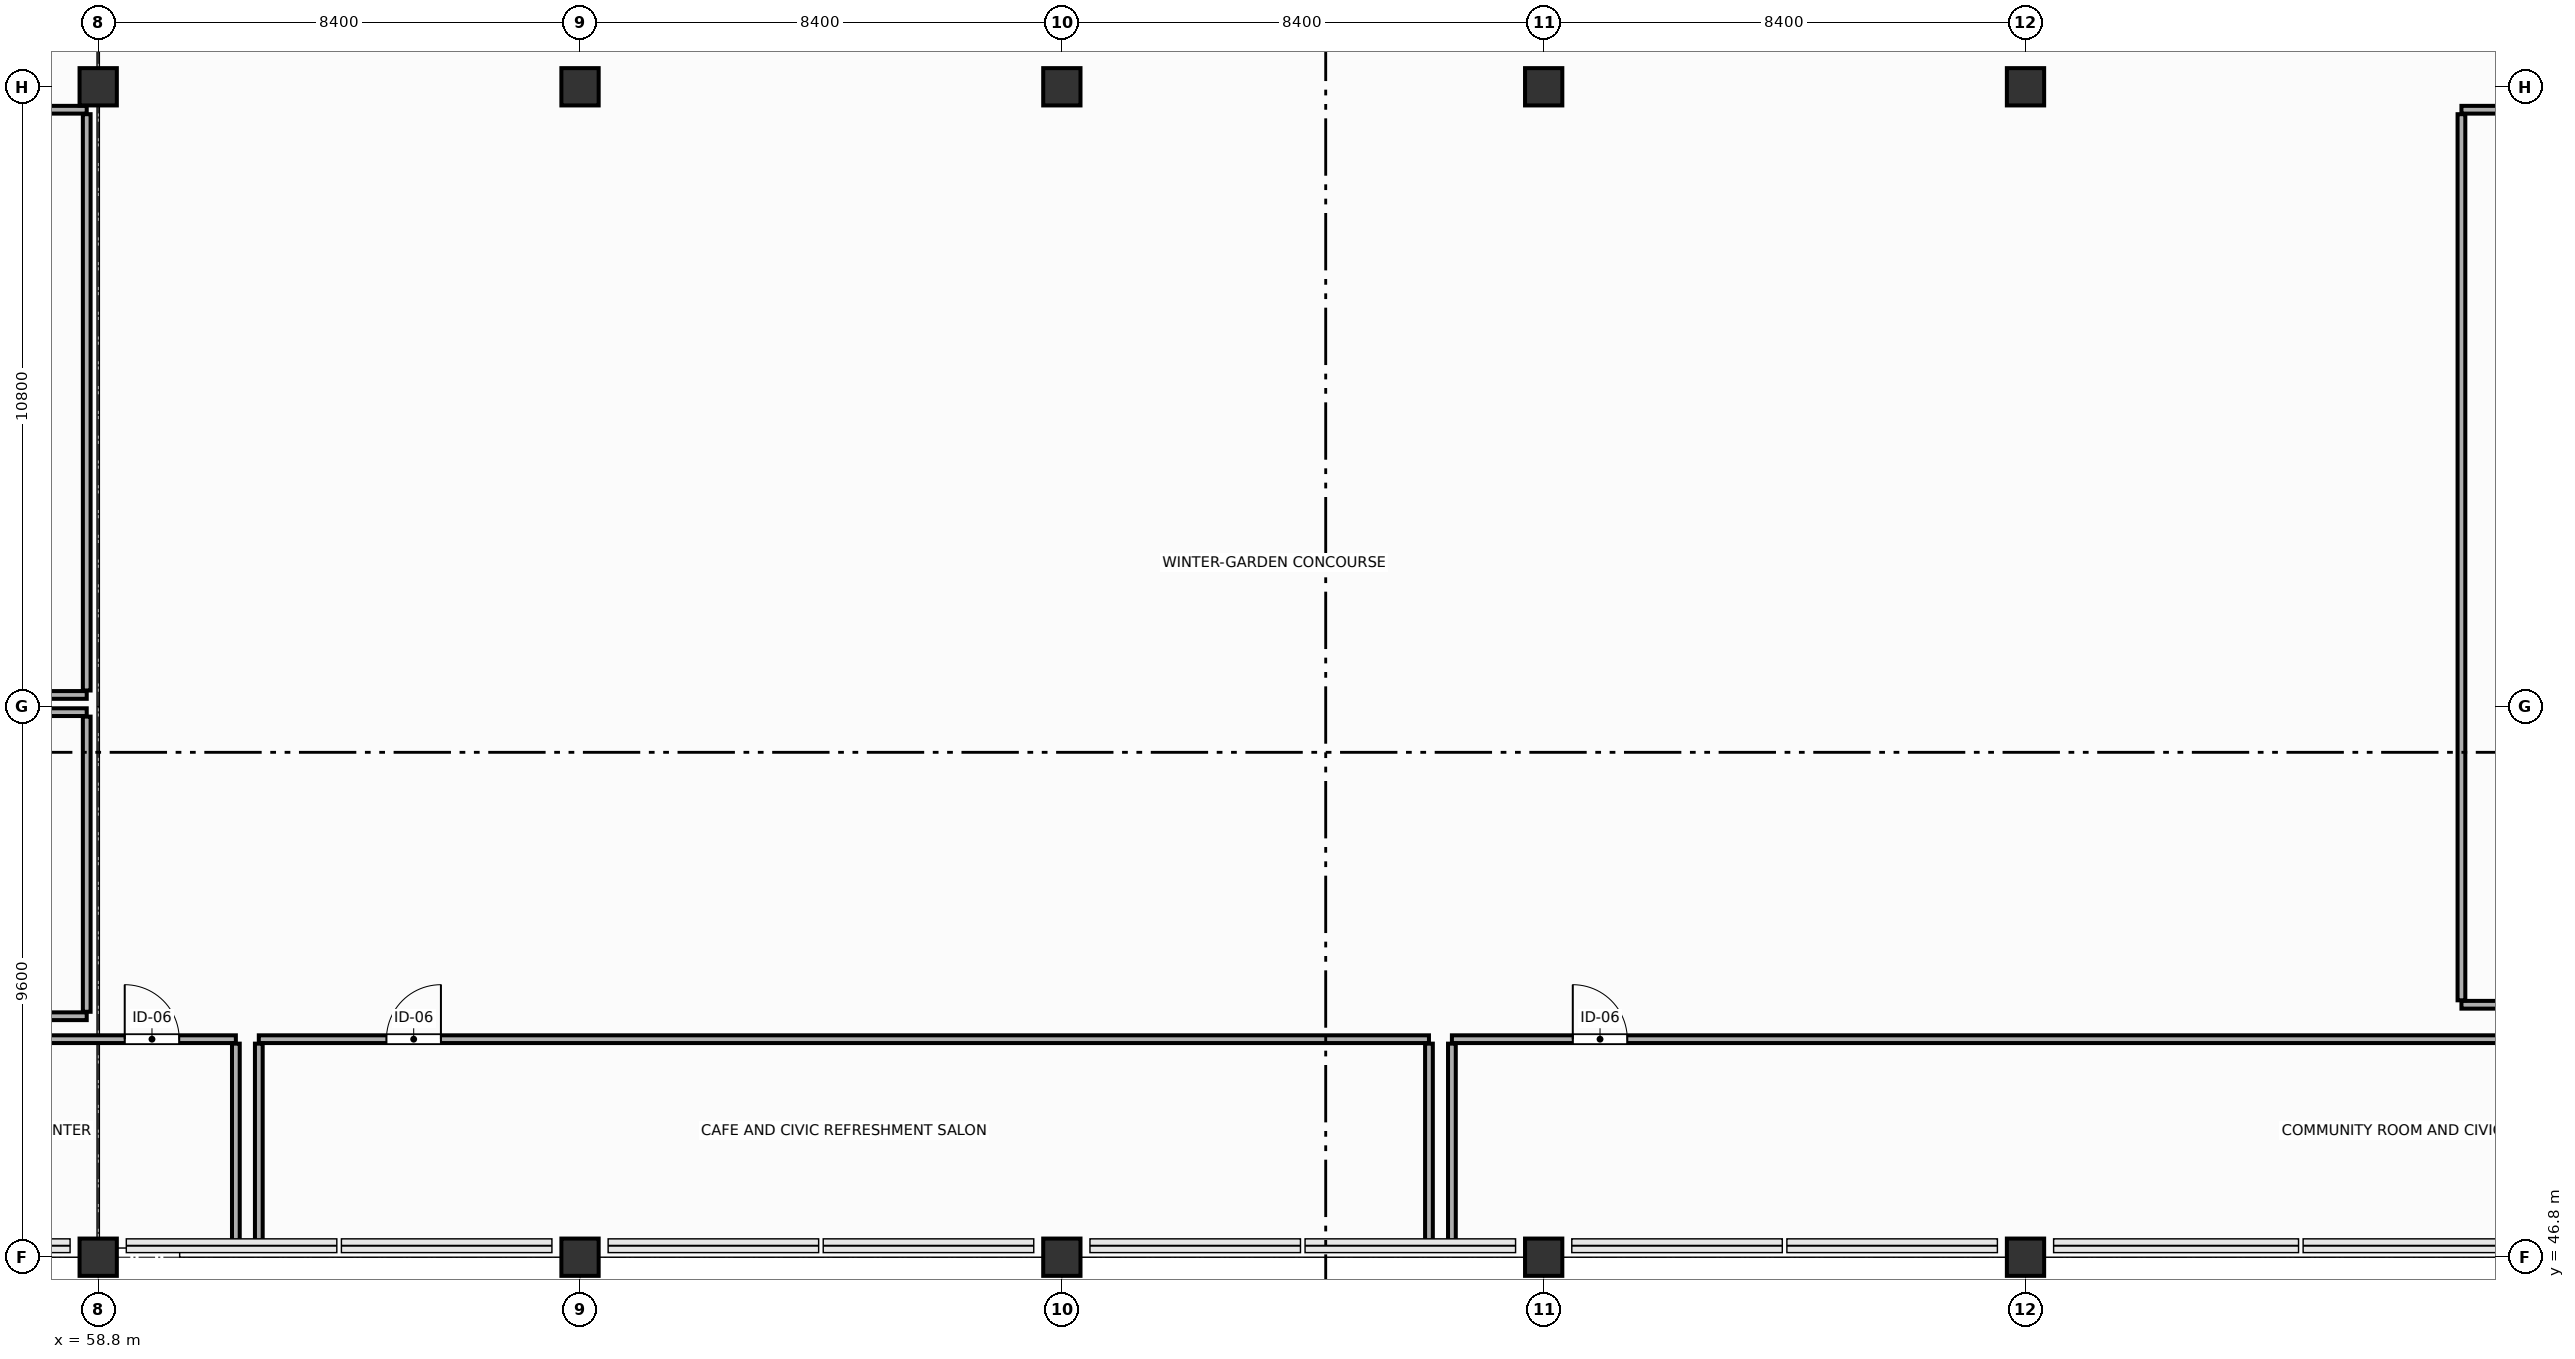
"""IFC4 building model, lengths in metres.
Left out: names, types, materials, properties, quantities, classifications, styles, units other than length and angle.
Written with IfcOpenShell. Run it as: python <this file> out.ifc"""

import sys

from ifc_helpers import new_model, si_unit, direction, frame, frame_2d, origin, origin_2d, place, context, subcontext, project, spatial, rectangle, extrude, element, fill, save


model = new_model("IFC4")
c1 = context("Model", 3, precision=1e-05, world=origin(), true_north=direction((0.0, 1.0)))
c2 = subcontext(c1, "Body", "Model", "MODEL_VIEW")
j1 = project(units=[si_unit("LENGTHUNIT", "METRE"), si_unit("PLANEANGLEUNIT", "RADIAN")], contexts=[c1])
p1 = place(None, origin())
s1 = spatial("IfcSite", under=j1, at=p1, CompositionType="ELEMENT")
p2 = place(p1, origin())
s2 = spatial("IfcBuilding", under=s1, at=p2, CompositionType="ELEMENT")
p3 = place(p2, origin())
s3 = spatial("IfcBuildingStorey", under=s2, at=p3, CompositionType="ELEMENT", Elevation=0.0)
for number, where, z_axis, x_axis in (
    (1, (58.8, 46.8, 0.0), (0.0, 0.0, 1.0), (1.0, 0.0, 0.0)),
    (2, (58.8, 67.2, 0.0), (0.0, 0.0, 1.0), (1.0, 0.0, 0.0)),
    (3, (67.2, 46.8, 0.0), (0.0, 0.0, 1.0), (1.0, 0.0, 0.0)),
    (4, (67.2, 67.2, 0.0), (0.0, 0.0, 1.0), (1.0, 0.0, 0.0)),
    (5, (75.6, 46.8, 0.0), (0.0, 0.0, 1.0), (1.0, 0.0, 0.0)),
    (6, (75.6, 67.2, 0.0), (0.0, 0.0, 1.0), (1.0, 0.0, 0.0)),
    (7, (84.0, 46.8, 0.0), (0.0, 0.0, 1.0), (1.0, 0.0, 0.0)),
    (8, (84.0, 67.2, 0.0), (0.0, 0.0, 1.0), (1.0, 0.0, 0.0)),
    (9, (92.4, 46.8, 0.0), (0.0, 0.0, 1.0), (1.0, 0.0, 0.0)),
    (10, (92.4, 67.2, 0.0), (0.0, 0.0, 1.0), (1.0, 0.0, 0.0)),
):
    element("IfcColumn", number, at=place(p3, frame(where, z_axis=z_axis, x_axis=x_axis)), inside=s3, PredefinedType="COLUMN", context=c2, shape_type="SweptSolid", body=[
        extrude(rectangle(XDim=0.65, YDim=0.65, at=origin_2d()), origin(), (0.0, 0.0, 1.0), 5.4),
    ])
p4 = place(p3, frame((46.8, 66.8, 0.0), z_axis=(0.0, 0.0, 1.0), x_axis=(1.0, 0.0, 0.0)))
e11 = element("IfcWall", 11, at=p4, inside=s3, PredefinedType="PARTITIONING", context=c2, shape_type="SweptSolid", body=[
    extrude(rectangle(XDim=11.8, YDim=0.135, at=frame_2d((5.9, 0.0))), origin(), (0.0, 0.0, 1.0), 4.13),
])
p5 = place(p4, frame((2.366, 0.0, 0.0)))
e12 = element("IfcOpeningElement", 12, at=p5, cuts=e11, PredefinedType="OPENING", context=c2, shape_type="SweptSolid", body=[
    extrude(rectangle(XDim=1.02, YDim=2.15, at=frame_2d((0.51, 1.075))), frame((0.0, 0.077, 0.0), z_axis=(0.0, -1.0, 0.0), x_axis=(1.0, 0.0, 0.0)), (0.0, 0.0, 1.0), 0.155),
])
p6 = place(p3, frame((58.6, 56.6, 0.0), z_axis=(0.0, 0.0, 1.0), x_axis=(-1.0, 0.0, 0.0)))
e13 = element("IfcWall", 13, at=p6, inside=s3, PredefinedType="PARTITIONING", context=c2, shape_type="SweptSolid", body=[
    extrude(rectangle(XDim=11.8, YDim=0.135, at=frame_2d((5.9, 0.0))), origin(), (0.0, 0.0, 1.0), 4.13),
])
p7 = place(p3, frame((58.6, 66.722, 0.0), z_axis=(0.0, 0.0, 1.0), x_axis=(0.0, -1.0, 0.0)))
e14 = element("IfcWall", 14, at=p7, inside=s3, PredefinedType="PARTITIONING", context=c2, shape_type="SweptSolid", body=[
    extrude(rectangle(XDim=10.045, YDim=0.135, at=frame_2d((5.022, 0.0))), origin(), (0.0, 0.0, 1.0), 4.13),
])
for number, where, z_axis, x_axis in (
    (15, (46.8, 56.3, 0.0), (0.0, 0.0, 1.0), (1.0, 0.0, 0.0)),
    (16, (58.6, 51.0, 0.0), (0.0, 0.0, 1.0), (-1.0, 0.0, 0.0)),
):
    element("IfcWall", number, at=place(p3, frame(where, z_axis=z_axis, x_axis=x_axis)), inside=s3, PredefinedType="PARTITIONING", context=c2, shape_type="SweptSolid", body=[
        extrude(rectangle(XDim=11.8, YDim=0.135, at=frame_2d((5.9, 0.0))), origin(), (0.0, 0.0, 1.0), 4.13),
    ])
p8 = place(p3, frame((58.6, 56.222, 0.0), z_axis=(0.0, 0.0, 1.0), x_axis=(0.0, -1.0, 0.0)))
e17 = element("IfcWall", 17, at=p8, inside=s3, PredefinedType="PARTITIONING", context=c2, shape_type="SweptSolid", body=[
    extrude(rectangle(XDim=5.145, YDim=0.135, at=frame_2d((2.573, 0.0))), origin(), (0.0, 0.0, 1.0), 4.13),
])
p9 = place(p3, frame((46.8, 50.6, 0.0), z_axis=(0.0, 0.0, 1.0), x_axis=(1.0, 0.0, 0.0)))
e18 = element("IfcWall", 18, at=p9, inside=s3, PredefinedType="PARTITIONING", context=c2, shape_type="SweptSolid", body=[
    extrude(rectangle(XDim=14.4, YDim=0.135, at=frame_2d((7.2, 0.0))), origin(), (0.0, 0.0, 1.0), 4.13),
])
p10 = place(p9, frame((12.462, 0.0, 0.0)))
e19 = element("IfcOpeningElement", 19, at=p10, cuts=e18, PredefinedType="OPENING", context=c2, shape_type="SweptSolid", body=[
    extrude(rectangle(XDim=0.95, YDim=2.15, at=frame_2d((0.475, 1.075))), frame((0.0, 0.077, 0.0), z_axis=(0.0, -1.0, 0.0), x_axis=(1.0, 0.0, 0.0)), (0.0, 0.0, 1.0), 0.155),
])
p11 = place(p3, frame((61.2, 50.522, 0.0), z_axis=(0.0, 0.0, 1.0), x_axis=(0.0, -1.0, 0.0)))
e20 = element("IfcWall", 20, at=p11, inside=s3, PredefinedType="PARTITIONING", context=c2, shape_type="SweptSolid", body=[
    extrude(rectangle(XDim=3.432, YDim=0.135, at=frame_2d((1.716, 0.0))), origin(), (0.0, 0.0, 1.0), 4.43),
])
p12 = place(p3, frame((61.6, 50.6, 0.0), z_axis=(0.0, 0.0, 1.0), x_axis=(1.0, 0.0, 0.0)))
e21 = element("IfcWall", 21, at=p12, inside=s3, PredefinedType="PARTITIONING", context=c2, shape_type="SweptSolid", body=[
    extrude(rectangle(XDim=20.4, YDim=0.135, at=frame_2d((10.2, 0.0))), origin(), (0.0, 0.0, 1.0), 5.125),
])
p13 = place(p12, frame((2.225, 0.0, 0.0)))
e22 = element("IfcOpeningElement", 22, at=p13, cuts=e21, PredefinedType="OPENING", context=c2, shape_type="SweptSolid", body=[
    extrude(rectangle(XDim=0.95, YDim=2.15, at=frame_2d((0.475, 1.075))), frame((0.0, 0.077, 0.0), z_axis=(0.0, -1.0, 0.0), x_axis=(1.0, 0.0, 0.0)), (0.0, 0.0, 1.0), 0.155),
])
for number, where, z_axis, x_axis in (
    (23, (61.6, 47.09, 0.0), (0.0, 0.0, 1.0), (0.0, 1.0, 0.0)),
    (24, (82.0, 50.522, 0.0), (0.0, 0.0, 1.0), (0.0, -1.0, 0.0)),
):
    element("IfcWall", number, at=place(p3, frame(where, z_axis=z_axis, x_axis=x_axis)), inside=s3, PredefinedType="PARTITIONING", context=c2, shape_type="SweptSolid", body=[
        extrude(rectangle(XDim=3.432, YDim=0.135, at=frame_2d((1.716, 0.0))), origin(), (0.0, 0.0, 1.0), 4.43),
    ])
p14 = place(p3, frame((82.4, 50.6, 0.0), z_axis=(0.0, 0.0, 1.0), x_axis=(1.0, 0.0, 0.0)))
e25 = element("IfcWall", 25, at=p14, inside=s3, PredefinedType="PARTITIONING", context=c2, shape_type="SweptSolid", body=[
    extrude(rectangle(XDim=36.8, YDim=0.135, at=frame_2d((18.4, 0.0))), origin(), (0.0, 0.0, 1.0), 4.13),
])
p15 = place(p14, frame((2.107, 0.0, 0.0)))
e26 = element("IfcOpeningElement", 26, at=p15, cuts=e25, PredefinedType="OPENING", context=c2, shape_type="SweptSolid", body=[
    extrude(rectangle(XDim=0.95, YDim=2.15, at=frame_2d((0.475, 1.075))), frame((0.0, 0.077, 0.0), z_axis=(0.0, -1.0, 0.0), x_axis=(1.0, 0.0, 0.0)), (0.0, 0.0, 1.0), 0.155),
])
p16 = place(p3, frame((82.4, 47.09, 0.0), z_axis=(0.0, 0.0, 1.0), x_axis=(0.0, 1.0, 0.0)))
e27 = element("IfcWall", 27, at=p16, inside=s3, PredefinedType="PARTITIONING", context=c2, shape_type="SweptSolid", body=[
    extrude(rectangle(XDim=3.432, YDim=0.135, at=frame_2d((1.716, 0.0))), origin(), (0.0, 0.0, 1.0), 4.43),
])
p17 = place(p3, frame((100.0, 66.8, 0.0), z_axis=(0.0, 0.0, 1.0), x_axis=(1.0, 0.0, 0.0)))
e28 = element("IfcWall", 28, at=p17, inside=s3, PredefinedType="PARTITIONING", context=c2, shape_type="SweptSolid", body=[
    extrude(rectangle(XDim=19.2, YDim=0.135, at=frame_2d((9.6, 0.0))), origin(), (0.0, 0.0, 1.0), 4.13),
])
p18 = place(p17, frame((5.615, 0.0, 0.0)))
e29 = element("IfcOpeningElement", 29, at=p18, cuts=e28, PredefinedType="OPENING", context=c2, shape_type="SweptSolid", body=[
    extrude(rectangle(XDim=0.95, YDim=2.15, at=frame_2d((0.475, 1.075))), frame((0.0, 0.077, 0.0), z_axis=(0.0, -1.0, 0.0), x_axis=(1.0, 0.0, 0.0)), (0.0, 0.0, 1.0), 0.155),
])
p19 = place(p3, frame((119.2, 51.2, 0.0), z_axis=(0.0, 0.0, 1.0), x_axis=(-1.0, 0.0, 0.0)))
e30 = element("IfcWall", 30, at=p19, inside=s3, PredefinedType="PARTITIONING", context=c2, shape_type="SweptSolid", body=[
    extrude(rectangle(XDim=19.2, YDim=0.135, at=frame_2d((9.6, 0.0))), origin(), (0.0, 0.0, 1.0), 4.13),
])
p20 = place(p3, frame((100.0, 51.278, 0.0), z_axis=(0.0, 0.0, 1.0), x_axis=(0.0, 1.0, 0.0)))
e31 = element("IfcWall", 31, at=p20, inside=s3, PredefinedType="PARTITIONING", context=c2, shape_type="SweptSolid", body=[
    extrude(rectangle(XDim=15.445, YDim=0.135, at=frame_2d((7.722, 0.0))), origin(), (0.0, 0.0, 1.0), 5.125),
])
p21 = place(p10, origin())
e32 = element("IfcDoor", 32, at=p21, inside=s3, OperationType="SINGLE_SWING_LEFT", PredefinedType="DOOR", context=c2, shape_type="SweptSolid", body=[
    extrude(rectangle(XDim=0.95, YDim=2.15, at=frame_2d((0.475, 1.075))), frame((0.0, 0.025, 0.0), z_axis=(0.0, -1.0, 0.0), x_axis=(1.0, 0.0, 0.0)), (0.0, 0.0, 1.0), 0.05),
])
fill(e19, e32)
p22 = place(p13, origin())
e33 = element("IfcDoor", 33, at=p22, inside=s3, OperationType="SINGLE_SWING_RIGHT", PredefinedType="DOOR", context=c2, shape_type="SweptSolid", body=[
    extrude(rectangle(XDim=0.95, YDim=2.15, at=frame_2d((0.475, 1.075))), frame((0.0, 0.025, 0.0), z_axis=(0.0, -1.0, 0.0), x_axis=(1.0, 0.0, 0.0)), (0.0, 0.0, 1.0), 0.05),
])
fill(e22, e33)
p23 = place(p15, origin())
e34 = element("IfcDoor", 34, at=p23, inside=s3, OperationType="SINGLE_SWING_LEFT", PredefinedType="DOOR", context=c2, shape_type="SweptSolid", body=[
    extrude(rectangle(XDim=0.95, YDim=2.15, at=frame_2d((0.475, 1.075))), frame((0.0, 0.025, 0.0), z_axis=(0.0, -1.0, 0.0), x_axis=(1.0, 0.0, 0.0)), (0.0, 0.0, 1.0), 0.05),
])
fill(e26, e34)
save(model, sys.argv[1])
